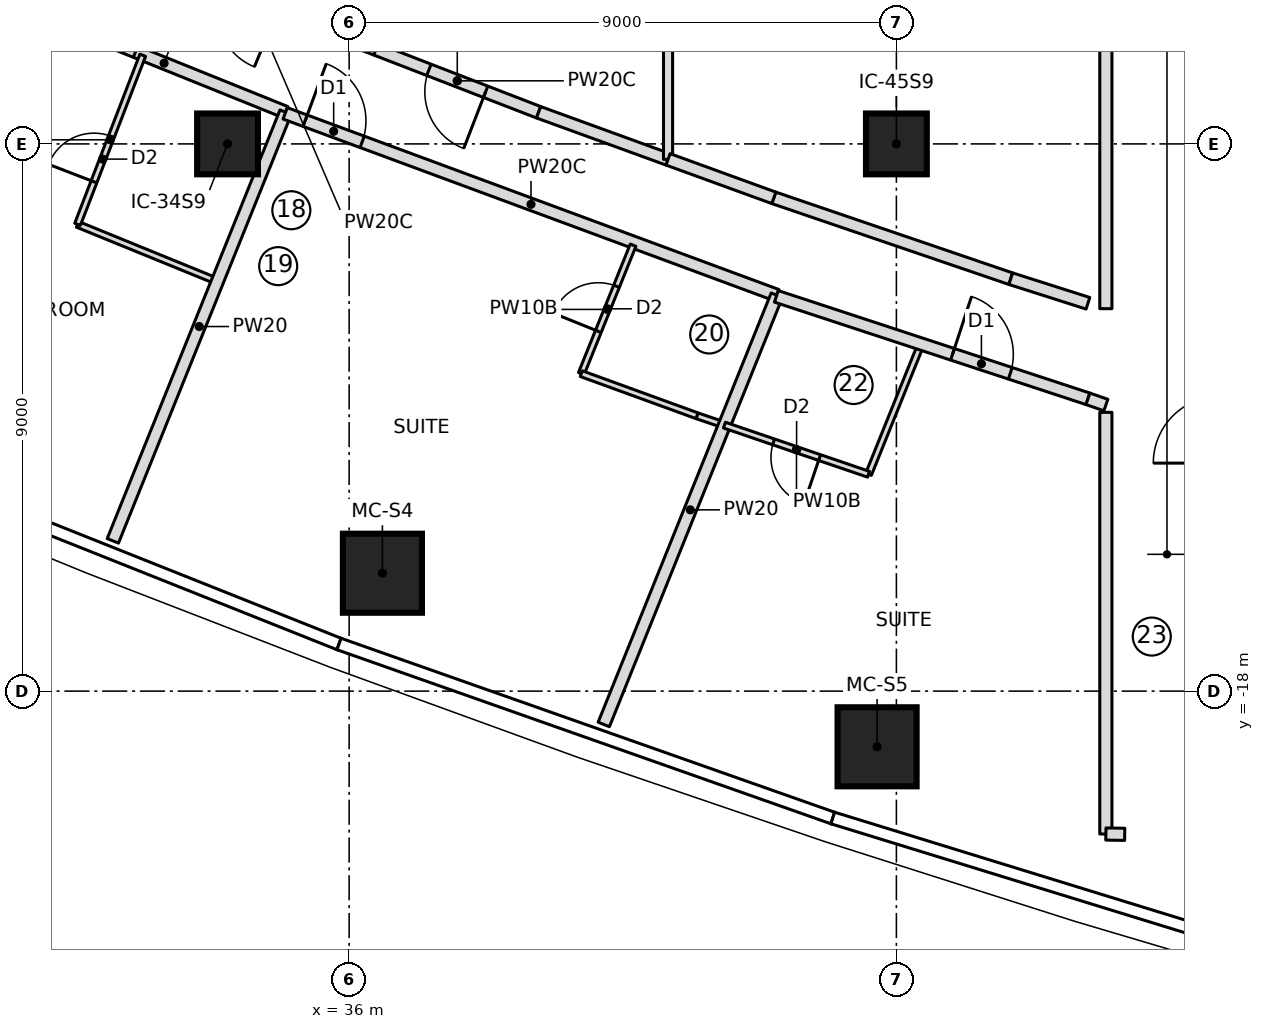
"""IFC4 building model, lengths in metres.
Left out: names, types, materials, properties, quantities, classifications, styles, units other than length and angle.
Written with IfcOpenShell. Run it as: python <this file> out.ifc"""

import sys

from ifc_helpers import new_model, si_unit, direction, frame, frame_2d, origin, origin_2d, place, context, subcontext, project, spatial, rectangle, extrude, element, fill, save


model = new_model("IFC4")
c1 = context("Model", 3, precision=1e-05, world=origin(), true_north=direction((0.0, 1.0)))
c2 = subcontext(c1, "Body", "Model", "MODEL_VIEW")
j1 = project(units=[si_unit("LENGTHUNIT", "METRE"), si_unit("PLANEANGLEUNIT", "RADIAN")], contexts=[c1])
p1 = place(None, origin())
s1 = spatial("IfcSite", under=j1, at=p1, CompositionType="ELEMENT")
p2 = place(p1, origin())
s2 = spatial("IfcBuilding", under=s1, at=p2, CompositionType="ELEMENT")
p3 = place(p2, frame((0.0, 0.0, 207.45)))
s3 = spatial("IfcBuildingStorey", under=s2, at=p3, CompositionType="ELEMENT", Elevation=207.45)
for number, where, z_axis, x_axis in (
    (1, (36.547, -16.061, 0.0), (0.0, 0.0, 1.0), (1.0, 0.0, 0.0)),
    (2, (44.683, -18.916, 0.0), (0.0, 0.0, 1.0), (1.0, 0.0, 0.0)),
):
    element("IfcColumn", number, at=place(p3, frame(where, z_axis=z_axis, x_axis=x_axis)), inside=s3, PredefinedType="COLUMN", context=c2, shape_type="SweptSolid", body=[
        extrude(rectangle(XDim=1.3, YDim=1.3, at=origin_2d()), origin(), (0.0, 0.0, 1.0), 3.55),
    ])
for number, where, z_axis, x_axis in (
    (3, (34.0, -9.0, 0.0), (0.0, 0.0, 1.0), (1.0, 0.0, 0.0)),
    (4, (45.0, -9.0, 0.0), (0.0, 0.0, 1.0), (1.0, 0.0, 0.0)),
):
    element("IfcColumn", number, at=place(p3, frame(where, z_axis=z_axis, x_axis=x_axis)), inside=s3, PredefinedType="COLUMN", context=c2, shape_type="SweptSolid", body=[
        extrude(rectangle(XDim=1.0, YDim=1.0, at=origin_2d()), origin(), (0.0, 0.0, 1.0), 3.55),
    ])
p4 = place(p3, frame((30.958, -6.866, 0.0), z_axis=(0.0, 0.0, 1.0), x_axis=(0.927398695046, -0.374074404933, 0.0)))
e5 = element("IfcWall", 5, at=p4, inside=s3, PredefinedType="PARTITIONING", context=c2, shape_type="SweptSolid", body=[
    extrude(rectangle(XDim=4.311, YDim=0.2, at=frame_2d((2.155, 0.0))), origin(), (0.0, 0.0, 1.0), 3.15),
])
p5 = place(p4, frame((0.65, 0.0, 0.0)))
e6 = element("IfcOpeningElement", 6, at=p5, cuts=e5, PredefinedType="OPENING", context=c2, shape_type="SweptSolid", body=[
    extrude(rectangle(XDim=1.0, YDim=2.1, at=frame_2d((0.5, 1.05))), frame((0.0, 0.11, 0.0), z_axis=(0.0, -1.0, 0.0), x_axis=(1.0, 0.0, 0.0)), (0.0, 0.0, 1.0), 0.22),
])
p6 = place(p3, frame((33.834, -11.261, 0.0), z_axis=(0.0, 0.0, 1.0), x_axis=(-0.925906573805, 0.377752586469, 0.0)))
e7 = element("IfcWall", 7, at=p6, inside=s3, PredefinedType="PARTITIONING", context=c2, shape_type="SweptSolid", body=[
    extrude(rectangle(XDim=2.484, YDim=0.1, at=frame_2d((1.242, 0.0))), origin(), (0.0, 0.0, 1.0), 3.15),
])
p7 = place(p3, frame((31.534, -10.323, 0.0), z_axis=(0.0, 0.0, 1.0), x_axis=(0.359610255373, 0.933102601127, 0.0)))
e8 = element("IfcWall", 8, at=p7, inside=s3, PredefinedType="PARTITIONING", context=c2, shape_type="SweptSolid", body=[
    extrude(rectangle(XDim=2.98, YDim=0.1, at=frame_2d((1.49, 0.0))), origin(), (0.0, 0.0, 1.0), 3.15),
])
p8 = place(p7, frame((0.75, 0.0, 0.0)))
e9 = element("IfcOpeningElement", 9, at=p8, cuts=e8, PredefinedType="OPENING", context=c2, shape_type="SweptSolid", body=[
    extrude(rectangle(XDim=0.8, YDim=2.1, at=frame_2d((0.4, 1.05))), frame((0.0, 0.06, 0.0), z_axis=(0.0, -1.0, 0.0), x_axis=(1.0, 0.0, 0.0)), (0.0, 0.0, 1.0), 0.12),
])
p9 = place(p3, frame((32.114, -15.528, 0.0), z_axis=(0.0, 0.0, 1.0), x_axis=(0.373881438439, 0.927476506436, 0.0)))
e10 = element("IfcWall", 10, at=p9, inside=s3, PredefinedType="PARTITIONING", context=c2, shape_type="SweptSolid", body=[
    extrude(rectangle(XDim=7.601, YDim=0.2, at=frame_2d((3.8, 0.0))), origin(), (0.0, 0.0, 1.0), 3.15),
])
p10 = place(p3, frame((34.948, -8.497, 0.0), z_axis=(0.0, 0.0, 1.0), x_axis=(0.937864515454, -0.347001657996, 0.0)))
e11 = element("IfcWall", 11, at=p10, inside=s3, PredefinedType="PARTITIONING", context=c2, shape_type="SweptSolid", body=[
    extrude(rectangle(XDim=8.621, YDim=0.2, at=frame_2d((4.311, 0.0))), origin(), (0.0, 0.0, 1.0), 3.15),
])
p11 = place(p10, frame((0.35, 0.0, 0.0)))
e12 = element("IfcOpeningElement", 12, at=p11, cuts=e11, PredefinedType="OPENING", context=c2, shape_type="SweptSolid", body=[
    extrude(rectangle(XDim=1.0, YDim=2.1, at=frame_2d((0.5, 1.05))), frame((0.0, 0.11, 0.0), z_axis=(0.0, -1.0, 0.0), x_axis=(1.0, 0.0, 0.0)), (0.0, 0.0, 1.0), 0.22),
])
p12 = place(p3, frame((39.818, -12.779, 0.0), z_axis=(0.0, 0.0, 1.0), x_axis=(0.373883593317, 0.927475637765, 0.0)))
e13 = element("IfcWall", 13, at=p12, inside=s3, PredefinedType="PARTITIONING", context=c2, shape_type="SweptSolid", body=[
    extrude(rectangle(XDim=2.278, YDim=0.1, at=frame_2d((1.139, 0.0))), origin(), (0.0, 0.0, 1.0), 3.15),
])
p13 = place(p12, frame((0.75, 0.0, 0.0)))
e14 = element("IfcOpeningElement", 14, at=p13, cuts=e13, PredefinedType="OPENING", context=c2, shape_type="SweptSolid", body=[
    extrude(rectangle(XDim=0.8, YDim=2.1, at=frame_2d((0.4, 1.05))), frame((0.0, 0.06, 0.0), z_axis=(0.0, -1.0, 0.0), x_axis=(1.0, 0.0, 0.0)), (0.0, 0.0, 1.0), 0.12),
])
p14 = place(p3, frame((42.172, -13.625, 0.0), z_axis=(0.0, 0.0, 1.0), x_axis=(-0.946456821894, 0.322830426526, 0.0)))
e15 = element("IfcWall", 15, at=p14, inside=s3, PredefinedType="PARTITIONING", context=c2, shape_type="SweptSolid", body=[
    extrude(rectangle(XDim=0.476, YDim=0.1, at=frame_2d((0.238, 0.0))), origin(), (0.0, 0.0, 1.0), 3.15),
])
p15 = place(p3, frame((41.721, -13.471, 0.0), z_axis=(0.0, 0.0, 1.0), x_axis=(-0.939737092411, 0.341897933814, 0.0)))
e16 = element("IfcWall", 16, at=p15, inside=s3, PredefinedType="PARTITIONING", context=c2, shape_type="SweptSolid", body=[
    extrude(rectangle(XDim=2.025, YDim=0.1, at=frame_2d((1.013, 0.0))), origin(), (0.0, 0.0, 1.0), 3.15),
])
p16 = place(p3, frame((40.188, -18.548, 0.0), z_axis=(0.0, 0.0, 1.0), x_axis=(0.373877998371, 0.927477893178, 0.0)))
e17 = element("IfcWall", 17, at=p16, inside=s3, PredefinedType="PARTITIONING", context=c2, shape_type="SweptSolid", body=[
    extrude(rectangle(XDim=7.611, YDim=0.2, at=frame_2d((3.806, 0.0))), origin(), (0.0, 0.0, 1.0), 3.15),
])
p17 = place(p3, frame((45.395, -12.318, 0.0), z_axis=(0.0, 0.0, 1.0), x_axis=(-0.373917841166, -0.927461831052, 0.0)))
e18 = element("IfcWall", 18, at=p17, inside=s3, PredefinedType="PARTITIONING", context=c2, shape_type="SweptSolid", body=[
    extrude(rectangle(XDim=2.281, YDim=0.1, at=frame_2d((1.14, 0.0))), origin(), (0.0, 0.0, 1.0), 3.15),
])
p18 = place(p3, frame((44.542, -14.434, 0.0), z_axis=(0.0, 0.0, 1.0), x_axis=(-0.946406575113, 0.322977699822, 0.0)))
e19 = element("IfcWall", 19, at=p18, inside=s3, PredefinedType="PARTITIONING", context=c2, shape_type="SweptSolid", body=[
    extrude(rectangle(XDim=2.504, YDim=0.1, at=frame_2d((1.252, 0.0))), origin(), (0.0, 0.0, 1.0), 3.15),
])
p19 = place(p18, frame((0.85, 0.0, 0.0)))
e20 = element("IfcOpeningElement", 20, at=p19, cuts=e19, PredefinedType="OPENING", context=c2, shape_type="SweptSolid", body=[
    extrude(rectangle(XDim=0.8, YDim=2.1, at=frame_2d((0.4, 1.05))), frame((0.0, 0.06, 0.0), z_axis=(0.0, -1.0, 0.0), x_axis=(1.0, 0.0, 0.0)), (0.0, 0.0, 1.0), 0.12),
])
p20 = place(p3, frame((36.441, -7.445, 0.0), z_axis=(0.0, 0.0, 1.0), x_axis=(-0.932724985261, 0.360588549276, 0.0)))
e21 = element("IfcWall", 21, at=p20, inside=s3, PredefinedType="PARTITIONING", context=c2, shape_type="SweptSolid", body=[
    extrude(rectangle(XDim=1.25, YDim=0.2, at=frame_2d((0.625, 0.0))), origin(), (0.0, 0.0, 1.0), 3.15),
])
p21 = place(p3, frame((39.115, -8.479, 0.0), z_axis=(0.0, 0.0, 1.0), x_axis=(-0.932650373077, 0.36078148733, 0.0)))
e22 = element("IfcWall", 22, at=p21, inside=s3, PredefinedType="PARTITIONING", context=c2, shape_type="SweptSolid", body=[
    extrude(rectangle(XDim=2.867, YDim=0.2, at=frame_2d((1.434, 0.0))), origin(), (0.0, 0.0, 1.0), 3.15),
])
p22 = place(p21, frame((0.934, 0.0, 0.0)))
e23 = element("IfcOpeningElement", 23, at=p22, cuts=e22, PredefinedType="OPENING", context=c2, shape_type="SweptSolid", body=[
    extrude(rectangle(XDim=1.0, YDim=2.1, at=frame_2d((0.5, 1.05))), frame((0.0, 0.11, 0.0), z_axis=(0.0, -1.0, 0.0), x_axis=(1.0, 0.0, 0.0)), (0.0, 0.0, 1.0), 0.22),
])
p23 = place(p3, frame((41.245, -9.254, 0.0), z_axis=(0.0, 0.0, 1.0), x_axis=(-0.939746227223, 0.341872824923, 0.0)))
e24 = element("IfcWall", 24, at=p23, inside=s3, PredefinedType="PARTITIONING", context=c2, shape_type="SweptSolid", body=[
    extrude(rectangle(XDim=2.266, YDim=0.2, at=frame_2d((1.133, 0.0))), origin(), (0.0, 0.0, 1.0), 3.15),
])
p24 = place(p3, frame((41.245, -9.254, 0.0), z_axis=(0.0, 0.0, 1.0), x_axis=(0.0, 1.0, 0.0)))
e25 = element("IfcWall", 25, at=p24, inside=s3, PredefinedType="PARTITIONING", context=c2, shape_type="SweptSolid", body=[
    extrude(rectangle(XDim=18.508, YDim=0.15, at=frame_2d((9.254, 0.0))), origin(), (0.0, 0.0, 1.0), 3.15),
])
p25 = place(p3, frame((46.881, -11.217, 0.0), z_axis=(0.0, 0.0, 1.0), x_axis=(-0.946436071896, 0.322891253852, 0.0)))
e26 = element("IfcWall", 26, at=p25, inside=s3, PredefinedType="PARTITIONING", context=c2, shape_type="SweptSolid", body=[
    extrude(rectangle(XDim=4.117, YDim=0.2, at=frame_2d((2.059, 0.0))), origin(), (0.0, 0.0, 1.0), 3.15),
])
p26 = place(p3, frame((42.984, -9.887, 0.0), z_axis=(0.0, 0.0, 1.0), x_axis=(-0.939704824537, 0.341986611933, 0.0)))
e27 = element("IfcWall", 27, at=p26, inside=s3, PredefinedType="PARTITIONING", context=c2, shape_type="SweptSolid", body=[
    extrude(rectangle(XDim=1.851, YDim=0.2, at=frame_2d((0.926, 0.0))), origin(), (0.0, 0.0, 1.0), 3.15),
])
p27 = place(p3, frame((43.026, -11.507, 0.0), z_axis=(0.0, 0.0, 1.0), x_axis=(0.949951949432, -0.312396052744, 0.0)))
e28 = element("IfcWall", 28, at=p27, inside=s3, PredefinedType="PARTITIONING", context=c2, shape_type="SweptSolid", body=[
    extrude(rectangle(XDim=5.394, YDim=0.2, at=frame_2d((2.697, 0.0))), origin(), (0.0, 0.0, 1.0), 3.15),
])
p28 = place(p27, frame((3.05, 0.0, 0.0)))
e29 = element("IfcOpeningElement", 29, at=p28, cuts=e28, PredefinedType="OPENING", context=c2, shape_type="SweptSolid", body=[
    extrude(rectangle(XDim=1.0, YDim=2.1, at=frame_2d((0.5, 1.05))), frame((0.0, 0.11, 0.0), z_axis=(0.0, -1.0, 0.0), x_axis=(1.0, 0.0, 0.0)), (0.0, 0.0, 1.0), 0.22),
])
p29 = place(p3, frame((48.15, -11.621, 0.0), z_axis=(0.0, 0.0, 1.0), x_axis=(-0.952761948983, 0.303718074157, 0.0)))
e30 = element("IfcWall", 30, at=p29, inside=s3, PredefinedType="PARTITIONING", context=c2, shape_type="SweptSolid", body=[
    extrude(rectangle(XDim=1.332, YDim=0.2, at=frame_2d((0.666, 0.0))), origin(), (0.0, 0.0, 1.0), 3.15),
])
p30 = place(p3, frame((48.445, 11.71, 0.0), z_axis=(0.0, 0.0, 1.0), x_axis=(0.0, -1.0, 0.0)))
e31 = element("IfcWall", 31, at=p30, inside=s3, PredefinedType="PARTITIONING", context=c2, shape_type="SweptSolid", body=[
    extrude(rectangle(XDim=23.42, YDim=0.2, at=frame_2d((11.71, 0.0))), origin(), (0.0, 0.0, 1.0), 3.15),
])
p31 = place(p3, frame((48.15, -13.192, 0.0), z_axis=(0.0, 0.0, 1.0), x_axis=(0.944623214561, -0.328156947987, 0.0)))
e32 = element("IfcWall", 32, at=p31, inside=s3, PredefinedType="PARTITIONING", context=c2, shape_type="SweptSolid", body=[
    extrude(rectangle(XDim=0.312, YDim=0.2, at=frame_2d((0.156, 0.0))), origin(), (0.0, 0.0, 1.0), 3.15),
])
p32 = place(p3, frame((48.445, -13.415, 0.0), z_axis=(0.0, 0.0, 1.0), x_axis=(0.0, -1.0, 0.0)))
e33 = element("IfcWall", 33, at=p32, inside=s3, PredefinedType="PARTITIONING", context=c2, shape_type="SweptSolid", body=[
    extrude(rectangle(XDim=6.935, YDim=0.2, at=frame_2d((3.468, 0.0))), origin(), (0.0, 0.0, 1.0), 3.15),
])
p33 = place(p3, frame((48.445, -20.35, 0.0), z_axis=(0.0, 0.0, 1.0), x_axis=(0.999849757003, -0.017333880736, 0.0)))
e34 = element("IfcWall", 34, at=p33, inside=s3, PredefinedType="PARTITIONING", context=c2, shape_type="SweptSolid", body=[
    extrude(rectangle(XDim=0.31, YDim=0.2, at=frame_2d((0.155, 0.0))), origin(), (0.0, 0.0, 1.0), 3.15),
])
p34 = place(p8, origin())
e35 = element("IfcDoor", 35, at=p34, inside=s3, OperationType="SINGLE_SWING_LEFT", PredefinedType="DOOR", context=c2, shape_type="SweptSolid", body=[
    extrude(rectangle(XDim=0.8, YDim=2.1, at=frame_2d((0.4, 1.05))), frame((0.0, 0.025, 0.0), z_axis=(0.0, -1.0, 0.0), x_axis=(1.0, 0.0, 0.0)), (0.0, 0.0, 1.0), 0.05),
])
fill(e9, e35)
p35 = place(p5, origin())
e36 = element("IfcDoor", 36, at=p35, inside=s3, OperationType="SINGLE_SWING_LEFT", PredefinedType="DOOR", context=c2, shape_type="SweptSolid", body=[
    extrude(rectangle(XDim=1.0, YDim=2.1, at=frame_2d((0.5, 1.05))), frame((0.0, 0.025, 0.0), z_axis=(0.0, -1.0, 0.0), x_axis=(1.0, 0.0, 0.0)), (0.0, 0.0, 1.0), 0.05),
])
fill(e6, e36)
p36 = place(p13, origin())
e37 = element("IfcDoor", 37, at=p36, inside=s3, OperationType="SINGLE_SWING_LEFT", PredefinedType="DOOR", context=c2, shape_type="SweptSolid", body=[
    extrude(rectangle(XDim=0.8, YDim=2.1, at=frame_2d((0.4, 1.05))), frame((0.0, 0.025, 0.0), z_axis=(0.0, -1.0, 0.0), x_axis=(1.0, 0.0, 0.0)), (0.0, 0.0, 1.0), 0.05),
])
fill(e14, e37)
p37 = place(p11, origin())
e38 = element("IfcDoor", 38, at=p37, inside=s3, OperationType="SINGLE_SWING_LEFT", PredefinedType="DOOR", context=c2, shape_type="SweptSolid", body=[
    extrude(rectangle(XDim=1.0, YDim=2.1, at=frame_2d((0.5, 1.05))), frame((0.0, 0.025, 0.0), z_axis=(0.0, -1.0, 0.0), x_axis=(1.0, 0.0, 0.0)), (0.0, 0.0, 1.0), 0.05),
])
fill(e12, e38)
p38 = place(p19, origin())
e39 = element("IfcDoor", 39, at=p38, inside=s3, OperationType="SINGLE_SWING_LEFT", PredefinedType="DOOR", context=c2, shape_type="SweptSolid", body=[
    extrude(rectangle(XDim=0.8, YDim=2.1, at=frame_2d((0.4, 1.05))), frame((0.0, 0.025, 0.0), z_axis=(0.0, -1.0, 0.0), x_axis=(1.0, 0.0, 0.0)), (0.0, 0.0, 1.0), 0.05),
])
fill(e20, e39)
p39 = place(p28, origin())
e40 = element("IfcDoor", 40, at=p39, inside=s3, OperationType="SINGLE_SWING_LEFT", PredefinedType="DOOR", context=c2, shape_type="SweptSolid", body=[
    extrude(rectangle(XDim=1.0, YDim=2.1, at=frame_2d((0.5, 1.05))), frame((0.0, 0.025, 0.0), z_axis=(0.0, -1.0, 0.0), x_axis=(1.0, 0.0, 0.0)), (0.0, 0.0, 1.0), 0.05),
])
fill(e29, e40)
p40 = place(p22, origin())
e41 = element("IfcDoor", 41, at=p40, inside=s3, OperationType="SINGLE_SWING_RIGHT", PredefinedType="DOOR", context=c2, shape_type="SweptSolid", body=[
    extrude(rectangle(XDim=1.0, YDim=2.1, at=frame_2d((0.5, 1.05))), frame((0.0, 0.025, 0.0), z_axis=(0.0, -1.0, 0.0), x_axis=(1.0, 0.0, 0.0)), (0.0, 0.0, 1.0), 0.05),
])
fill(e23, e41)
save(model, sys.argv[1])
